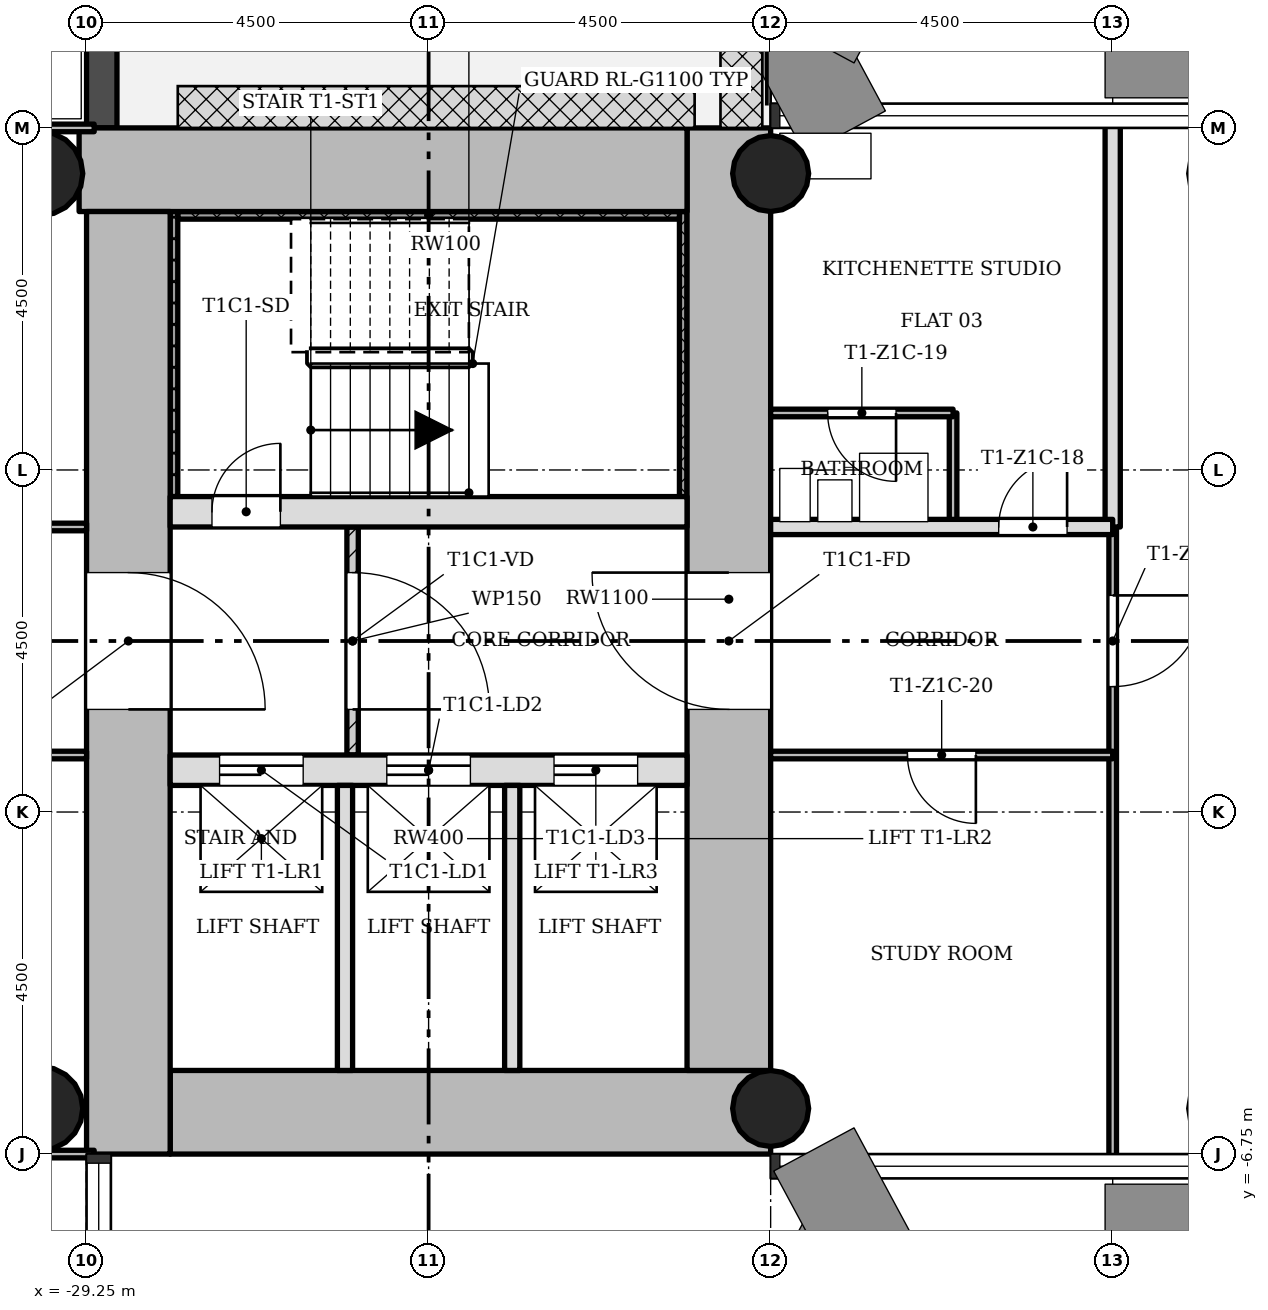
"""IFC4 building model, lengths in metres.
Left out: names, types, materials, properties, quantities, classifications, styles, units other than length and angle.
Written with IfcOpenShell. Run it as: python <this file> out.ifc"""

import sys

from ifc_helpers import new_model, si_unit, direction, frame, frame_2d, origin, origin_2d, place, context, subcontext, project, spatial, rectangle, hollow_circle, extrude, element, fill, save


model = new_model("IFC4")
c1 = context("Model", 3, precision=1e-05, world=origin(), true_north=direction((0.0, 1.0)))
c2 = subcontext(c1, "Body", "Model", "MODEL_VIEW")
j1 = project(units=[si_unit("LENGTHUNIT", "METRE"), si_unit("PLANEANGLEUNIT", "RADIAN")], contexts=[c1])
p1 = place(None, origin())
s1 = spatial("IfcSite", under=j1, at=p1, CompositionType="ELEMENT")
p2 = place(p1, origin())
s2 = spatial("IfcBuilding", under=s1, at=p2, CompositionType="ELEMENT")
p3 = place(p2, frame((0.0, 0.0, 51.7)))
s3 = spatial("IfcBuildingStorey", under=s2, at=p3, CompositionType="ELEMENT", Elevation=51.7)
p4 = place(p3, frame((-28.15, -6.2, 0.0), z_axis=(0.0, 0.0, 1.0), x_axis=(1.0, 0.0, 0.0)))
e1 = element("IfcWall", 1, at=p4, inside=s3, PredefinedType="SHEAR", context=c2, shape_type="SweptSolid", body=[
    extrude(rectangle(XDim=7.9, YDim=1.1, at=frame_2d((3.95, 0.0))), origin(), (0.0, 0.0, 1.0), 3.4),
])
p5 = place(p3, frame((-20.8, -5.65, 0.0), z_axis=(0.0, 0.0, 1.0), x_axis=(0.0, 1.0, 0.0)))
e2 = element("IfcWall", 2, at=p5, inside=s3, PredefinedType="SHEAR", context=c2, shape_type="SweptSolid", body=[
    extrude(rectangle(XDim=12.4, YDim=1.1, at=frame_2d((6.2, 0.0))), origin(), (0.0, 0.0, 1.0), 3.4),
])
p6 = place(p5, frame((4.75, 0.0, 0.0)))
e3 = element("IfcOpeningElement", 3, at=p6, cuts=e2, PredefinedType="OPENING", context=c2, shape_type="SweptSolid", body=[
    extrude(rectangle(XDim=1.8, YDim=2.1, at=frame_2d((0.9, 1.05))), frame((0.0, 0.56, 0.0), z_axis=(0.0, -1.0, 0.0), x_axis=(1.0, 0.0, 0.0)), (0.0, 0.0, 1.0), 1.12),
])
p7 = place(p3, frame((-21.35, 6.2, 0.0), z_axis=(0.0, 0.0, 1.0), x_axis=(-1.0, 0.0, 0.0)))
e4 = element("IfcWall", 4, at=p7, inside=s3, PredefinedType="SHEAR", context=c2, shape_type="SweptSolid", body=[
    extrude(rectangle(XDim=7.998, YDim=1.1, at=frame_2d((3.999, 0.0))), origin(), (0.0, 0.0, 1.0), 3.4),
])
p8 = place(p3, frame((-28.7, 5.65, 0.0), z_axis=(0.0, 0.0, 1.0), x_axis=(0.0, -1.0, 0.0)))
e5 = element("IfcWall", 5, at=p8, inside=s3, PredefinedType="SHEAR", context=c2, shape_type="SweptSolid", body=[
    extrude(rectangle(XDim=12.4, YDim=1.1, at=frame_2d((6.2, 0.0))), origin(), (0.0, 0.0, 1.0), 3.4),
])
p9 = place(p8, frame((4.75, 0.0, 0.0)))
e6 = element("IfcOpeningElement", 6, at=p9, cuts=e5, PredefinedType="OPENING", context=c2, shape_type="SweptSolid", body=[
    extrude(rectangle(XDim=1.8, YDim=2.1, at=frame_2d((0.9, 1.05))), frame((0.0, 0.56, 0.0), z_axis=(0.0, -1.0, 0.0), x_axis=(1.0, 0.0, 0.0)), (0.0, 0.0, 1.0), 1.12),
])
p10 = place(p3, frame((-28.15, -1.7, 0.0), z_axis=(0.0, 0.0, 1.0), x_axis=(1.0, 0.0, 0.0)))
e7 = element("IfcWall", 7, at=p10, inside=s3, PredefinedType="SHEAR", context=c2, shape_type="SweptSolid", body=[
    extrude(rectangle(XDim=6.8, YDim=0.4, at=frame_2d((3.4, 0.0))), origin(), (0.0, 0.0, 1.0), 3.4),
])
p11 = place(p10, frame((0.65, 0.0, 0.0)))
e8 = element("IfcOpeningElement", 8, at=p11, cuts=e7, PredefinedType="OPENING", context=c2, shape_type="SweptSolid", body=[
    extrude(rectangle(XDim=1.1, YDim=2.1, at=frame_2d((0.55, 1.05))), frame((0.0, 0.21, 0.0), z_axis=(0.0, -1.0, 0.0), x_axis=(1.0, 0.0, 0.0)), (0.0, 0.0, 1.0), 0.42),
])
p12 = place(p10, frame((2.85, 0.0, 0.0)))
e9 = element("IfcOpeningElement", 9, at=p12, cuts=e7, PredefinedType="OPENING", context=c2, shape_type="SweptSolid", body=[
    extrude(rectangle(XDim=1.1, YDim=2.1, at=frame_2d((0.55, 1.05))), frame((0.0, 0.21, 0.0), z_axis=(0.0, -1.0, 0.0), x_axis=(1.0, 0.0, 0.0)), (0.0, 0.0, 1.0), 0.42),
])
p13 = place(p10, frame((5.05, 0.0, 0.0)))
e10 = element("IfcOpeningElement", 10, at=p13, cuts=e7, PredefinedType="OPENING", context=c2, shape_type="SweptSolid", body=[
    extrude(rectangle(XDim=1.1, YDim=2.1, at=frame_2d((0.55, 1.05))), frame((0.0, 0.21, 0.0), z_axis=(0.0, -1.0, 0.0), x_axis=(1.0, 0.0, 0.0)), (0.0, 0.0, 1.0), 0.42),
])
p14 = place(p3, frame((-28.15, 1.7, 0.0), z_axis=(0.0, 0.0, 1.0), x_axis=(1.0, 0.0, 0.0)))
e11 = element("IfcWall", 11, at=p14, inside=s3, PredefinedType="SHEAR", context=c2, shape_type="SweptSolid", body=[
    extrude(rectangle(XDim=6.8, YDim=0.4, at=frame_2d((3.4, 0.0))), origin(), (0.0, 0.0, 1.0), 3.4),
])
p15 = place(p14, frame((0.55, 0.0, 0.0)))
e12 = element("IfcOpeningElement", 12, at=p15, cuts=e11, PredefinedType="OPENING", context=c2, shape_type="SweptSolid", body=[
    extrude(rectangle(XDim=0.9, YDim=2.1, at=frame_2d((0.45, 1.05))), frame((0.0, 0.21, 0.0), z_axis=(0.0, -1.0, 0.0), x_axis=(1.0, 0.0, 0.0)), (0.0, 0.0, 1.0), 0.42),
])
for number, where, z_axis, x_axis in (
    (13, (-20.25, -6.15, 0.0), (0.0, 0.0, 1.0), (1.0, 0.0, 0.0)),
    (14, (-20.25, 6.15, 0.0), (0.0, 0.0, 1.0), (1.0, 0.0, 0.0)),
):
    element("IfcColumn", number, at=place(p3, frame(where, z_axis=z_axis, x_axis=x_axis)), inside=s3, PredefinedType="COLUMN", context=c2, shape_type="SweptSolid", body=[
        extrude(hollow_circle(Radius=0.5, WallThickness=0.036, at=origin_2d()), origin(), (0.0, 0.0, 1.0), 3.4),
    ])
for number, where, z_axis, x_axis in (
    (15, (-29.85, -6.15, 0.0), (0.0, 0.0, 1.0), (1.0, 0.0, 0.0)),
    (16, (-29.85, 6.15, 0.0), (0.0, 0.0, 1.0), (1.0, 0.0, 0.0)),
):
    element("IfcColumn", number, at=place(p3, frame(where, z_axis=z_axis, x_axis=x_axis)), inside=s3, PredefinedType="COLUMN", context=c2, shape_type="SweptSolid", body=[
        extrude(hollow_circle(Radius=0.55, WallThickness=0.04, at=origin_2d()), origin(), (0.0, 0.0, 1.0), 3.4),
    ])
p16 = place(p3, frame((-29.05, 6.75, -0.02), z_axis=(0.0, 0.0, 1.0), x_axis=(0.0, 1.0, 0.0)))
e17 = element("IfcWall", 17, at=p16, inside=s3, PredefinedType="STANDARD", context=c2, shape_type="SweptSolid", body=[
    extrude(rectangle(XDim=4.5, YDim=0.4, at=frame_2d((2.25, 0.0))), origin(), (0.0, 0.0, 1.0), 3.12),
])
p17 = place(p16, frame((1.35, 0.0, 0.02)))
e18 = element("IfcOpeningElement", 18, at=p17, cuts=e17, PredefinedType="OPENING", context=c2, shape_type="SweptSolid", body=[
    extrude(rectangle(XDim=1.8, YDim=2.1, at=frame_2d((0.9, 1.05))), frame((0.0, 0.21, 0.0), z_axis=(0.0, -1.0, 0.0), x_axis=(1.0, 0.0, 0.0)), (0.0, 0.0, 1.0), 0.42),
])
p18 = place(p3, frame((-25.75, -1.5, 0.0), z_axis=(0.0, 0.0, 1.0), x_axis=(0.0, 1.0, 0.0)))
e19 = element("IfcWall", 19, at=p18, inside=s3, PredefinedType="PARTITIONING", context=c2, shape_type="SweptSolid", body=[
    extrude(rectangle(XDim=3.0, YDim=0.15, at=frame_2d((1.5, 0.0))), origin(), (0.0, 0.0, 1.0), 3.0),
])
p19 = place(p18, frame((0.6, 0.0, 0.0)))
e20 = element("IfcOpeningElement", 20, at=p19, cuts=e19, PredefinedType="OPENING", context=c2, shape_type="SweptSolid", body=[
    extrude(rectangle(XDim=1.8, YDim=2.1, at=frame_2d((0.9, 1.05))), frame((0.0, 0.085, 0.0), z_axis=(0.0, -1.0, 0.0), x_axis=(1.0, 0.0, 0.0)), (0.0, 0.0, 1.0), 0.17),
])
for number, where, z_axis, x_axis in (
    (21, (-25.85, -5.65, 0.0), (0.0, 0.0, 1.0), (0.0, 1.0, 0.0)),
    (22, (-23.65, -5.65, 0.0), (0.0, 0.0, 1.0), (0.0, 1.0, 0.0)),
):
    element("IfcWall", number, at=place(p3, frame(where, z_axis=z_axis, x_axis=x_axis)), inside=s3, PredefinedType="SOLIDWALL", context=c2, shape_type="SweptSolid", body=[
        extrude(rectangle(XDim=3.75, YDim=0.2, at=frame_2d((1.875, 0.0))), origin(), (0.0, 0.0, 1.0), 3.0),
    ])
p20 = place(p3, frame((-17.85, 1.5, 0.0), z_axis=(0.0, 0.0, 1.0), x_axis=(0.0, 1.0, 0.0)))
e23 = element("IfcWall", 23, at=p20, inside=s3, PredefinedType="PARTITIONING", context=c2, shape_type="SweptSolid", body=[
    extrude(rectangle(XDim=1.5, YDim=0.1, at=frame_2d((0.75, 0.0))), origin(), (0.0, 0.0, 1.0), 3.0),
])
p21 = place(p3, frame((-15.75, -6.85, 0.0), z_axis=(0.0, 0.0, 1.0), x_axis=(0.0, 1.0, 0.0)))
e24 = element("IfcWall", 24, at=p21, inside=s3, PredefinedType="PARTITIONING", context=c2, shape_type="SweptSolid", body=[
    extrude(rectangle(XDim=8.35, YDim=0.1, at=frame_2d((4.175, 0.0))), origin(), (0.0, 0.0, 1.0), 3.0),
])
p22 = place(p21, frame((6.25, 0.0, 0.0)))
e25 = element("IfcOpeningElement", 25, at=p22, cuts=e24, PredefinedType="OPENING", context=c2, shape_type="SweptSolid", body=[
    extrude(rectangle(XDim=1.2, YDim=2.1, at=frame_2d((0.6, 1.05))), frame((0.0, 0.06, 0.0), z_axis=(0.0, -1.0, 0.0), x_axis=(1.0, 0.0, 0.0)), (0.0, 0.0, 1.0), 0.12),
])
p23 = place(p3, frame((-15.75, 1.5, 0.0), z_axis=(0.0, 0.0, 1.0), x_axis=(0.0, 1.0, 0.0)))
e26 = element("IfcWall", 26, at=p23, inside=s3, PredefinedType="SOLIDWALL", context=c2, shape_type="SweptSolid", body=[
    extrude(rectangle(XDim=5.35, YDim=0.2, at=frame_2d((2.675, 0.0))), origin(), (0.0, 0.0, 1.0), 3.0),
])
p24 = place(p3, frame((-35.1, -6.75, 0.0), z_axis=(0.0, 0.0, 1.0), x_axis=(1.0, 0.0, 0.0)))
e27 = element("IfcWall", 27, at=p24, inside=s3, PredefinedType="PARTITIONING", context=c2, shape_type="SweptSolid", body=[
    extrude(rectangle(XDim=5.95, YDim=0.1, at=frame_2d((2.975, 0.0))), origin(), (0.0, 0.0, 1.0), 3.0),
])
p25 = place(p3, frame((-35.1, -1.5, 0.0), z_axis=(0.0, 0.0, 1.0), x_axis=(1.0, 0.0, 0.0)))
e28 = element("IfcWall", 28, at=p25, inside=s3, PredefinedType="PARTITIONING", context=c2, shape_type="SweptSolid", body=[
    extrude(rectangle(XDim=5.85, YDim=0.1, at=frame_2d((2.925, 0.0))), origin(), (0.0, 0.0, 1.0), 3.0),
])
p26 = place(p25, frame((2.475, 0.0, 0.0)))
e29 = element("IfcOpeningElement", 29, at=p26, cuts=e28, PredefinedType="OPENING", context=c2, shape_type="SweptSolid", body=[
    extrude(rectangle(XDim=0.9, YDim=2.1, at=frame_2d((0.45, 1.05))), frame((0.0, 0.06, 0.0), z_axis=(0.0, -1.0, 0.0), x_axis=(1.0, 0.0, 0.0)), (0.0, 0.0, 1.0), 0.12),
])
p27 = place(p3, frame((-20.25, -1.5, 0.0), z_axis=(0.0, 0.0, 1.0), x_axis=(1.0, 0.0, 0.0)))
e30 = element("IfcWall", 30, at=p27, inside=s3, PredefinedType="PARTITIONING", context=c2, shape_type="SweptSolid", body=[
    extrude(rectangle(XDim=4.5, YDim=0.1, at=frame_2d((2.25, 0.0))), origin(), (0.0, 0.0, 1.0), 3.0),
])
p28 = place(p27, frame((1.8, 0.0, 0.0)))
e31 = element("IfcOpeningElement", 31, at=p28, cuts=e30, PredefinedType="OPENING", context=c2, shape_type="SweptSolid", body=[
    extrude(rectangle(XDim=0.9, YDim=2.1, at=frame_2d((0.45, 1.05))), frame((0.0, 0.06, 0.0), z_axis=(0.0, -1.0, 0.0), x_axis=(1.0, 0.0, 0.0)), (0.0, 0.0, 1.0), 0.12),
])
p29 = place(p3, frame((-35.1, 1.5, 0.0), z_axis=(0.0, 0.0, 1.0), x_axis=(1.0, 0.0, 0.0)))
e32 = element("IfcWall", 32, at=p29, inside=s3, PredefinedType="PARTITIONING", context=c2, shape_type="SweptSolid", body=[
    extrude(rectangle(XDim=5.85, YDim=0.1, at=frame_2d((2.925, 0.0))), origin(), (0.0, 0.0, 1.0), 3.0),
])
p30 = place(p29, frame((3.375, 0.0, 0.0)))
e33 = element("IfcOpeningElement", 33, at=p30, cuts=e32, PredefinedType="OPENING", context=c2, shape_type="SweptSolid", body=[
    extrude(rectangle(XDim=0.9, YDim=2.1, at=frame_2d((0.45, 1.05))), frame((0.0, 0.06, 0.0), z_axis=(0.0, -1.0, 0.0), x_axis=(1.0, 0.0, 0.0)), (0.0, 0.0, 1.0), 0.12),
])
p31 = place(p3, frame((-20.25, 1.5, 0.0), z_axis=(0.0, 0.0, 1.0), x_axis=(1.0, 0.0, 0.0)))
e34 = element("IfcWall", 34, at=p31, inside=s3, PredefinedType="SOLIDWALL", context=c2, shape_type="SweptSolid", body=[
    extrude(rectangle(XDim=4.5, YDim=0.2, at=frame_2d((2.25, 0.0))), origin(), (0.0, 0.0, 1.0), 3.0),
])
p32 = place(p31, frame((3.0, 0.0, 0.0)))
e35 = element("IfcOpeningElement", 35, at=p32, cuts=e34, PredefinedType="OPENING", context=c2, shape_type="SweptSolid", body=[
    extrude(rectangle(XDim=0.9, YDim=2.1, at=frame_2d((0.45, 1.05))), frame((0.0, 0.11, 0.0), z_axis=(0.0, -1.0, 0.0), x_axis=(1.0, 0.0, 0.0)), (0.0, 0.0, 1.0), 0.22),
])
p33 = place(p3, frame((-20.25, 3.0, 0.0), z_axis=(0.0, 0.0, 1.0), x_axis=(1.0, 0.0, 0.0)))
e36 = element("IfcWall", 36, at=p33, inside=s3, PredefinedType="PARTITIONING", context=c2, shape_type="SweptSolid", body=[
    extrude(rectangle(XDim=2.4, YDim=0.1, at=frame_2d((1.2, 0.0))), origin(), (0.0, 0.0, 1.0), 3.0),
])
p34 = place(p33, frame((0.75, 0.0, 0.0)))
e37 = element("IfcOpeningElement", 37, at=p34, cuts=e36, PredefinedType="OPENING", context=c2, shape_type="SweptSolid", body=[
    extrude(rectangle(XDim=0.9, YDim=2.1, at=frame_2d((0.45, 1.05))), frame((0.0, 0.06, 0.0), z_axis=(0.0, -1.0, 0.0), x_axis=(1.0, 0.0, 0.0)), (0.0, 0.0, 1.0), 0.12),
])
p35 = place(p3, frame((-35.1, 6.75, 0.0), z_axis=(0.0, 0.0, 1.0), x_axis=(1.0, 0.0, 0.0)))
e38 = element("IfcWall", 38, at=p35, inside=s3, PredefinedType="PARTITIONING", context=c2, shape_type="SweptSolid", body=[
    extrude(rectangle(XDim=5.95, YDim=0.1, at=frame_2d((2.975, 0.0))), origin(), (0.0, 0.0, 1.0), 3.0),
])
p36 = place(p3, frame((-21.4, 1.9, 0.0), z_axis=(0.0, 0.0, 1.0), x_axis=(0.0, 1.0, 0.0)))
e39 = element("IfcWall", 39, at=p36, inside=s3, PredefinedType="SHEAR", context=c2, shape_type="SweptSolid", body=[
    extrude(rectangle(XDim=3.75, YDim=0.1, at=frame_2d((1.875, 0.0))), origin(), (0.0, 0.0, 1.0), 3.4),
])
p37 = place(p3, frame((-28.05, 5.6, 0.0), z_axis=(0.0, 0.0, 1.0), x_axis=(1.0, 0.0, 0.0)))
e40 = element("IfcWall", 40, at=p37, inside=s3, PredefinedType="SHEAR", context=c2, shape_type="SweptSolid", body=[
    extrude(rectangle(XDim=6.6, YDim=0.1, at=frame_2d((3.3, 0.0))), origin(), (0.0, 0.0, 1.0), 3.4),
])
p38 = place(p3, frame((-28.1, 1.9, 0.0), z_axis=(0.0, 0.0, 1.0), x_axis=(0.0, 1.0, 0.0)))
e41 = element("IfcWall", 41, at=p38, inside=s3, PredefinedType="SHEAR", context=c2, shape_type="SweptSolid", body=[
    extrude(rectangle(XDim=3.75, YDim=0.1, at=frame_2d((1.875, 0.0))), origin(), (0.0, 0.0, 1.0), 3.4),
])
p39 = place(p19, origin())
e42 = element("IfcDoor", 42, at=p39, inside=s3, OperationType="SINGLE_SWING_LEFT", PredefinedType="DOOR", context=c2, shape_type="SweptSolid", body=[
    extrude(rectangle(XDim=1.8, YDim=2.1, at=frame_2d((0.9, 1.05))), frame((0.0, 0.025, 0.0), z_axis=(0.0, -1.0, 0.0), x_axis=(1.0, 0.0, 0.0)), (0.0, 0.0, 1.0), 0.05),
])
fill(e20, e42)
p40 = place(p32, origin())
e43 = element("IfcDoor", 43, at=p40, inside=s3, OperationType="SINGLE_SWING_LEFT", PredefinedType="DOOR", context=c2, shape_type="SweptSolid", body=[
    extrude(rectangle(XDim=0.9, YDim=2.1, at=frame_2d((0.45, 1.05))), frame((0.0, 0.025, 0.0), z_axis=(0.0, -1.0, 0.0), x_axis=(1.0, 0.0, 0.0)), (0.0, 0.0, 1.0), 0.05),
])
fill(e35, e43)
p41 = place(p34, origin())
e44 = element("IfcDoor", 44, at=p41, inside=s3, OperationType="SINGLE_SWING_RIGHT", PredefinedType="DOOR", context=c2, shape_type="SweptSolid", body=[
    extrude(rectangle(XDim=0.9, YDim=2.1, at=frame_2d((0.45, 1.05))), frame((0.0, 0.025, 0.0), z_axis=(0.0, -1.0, 0.0), x_axis=(1.0, 0.0, 0.0)), (0.0, 0.0, 1.0), 0.05),
])
fill(e37, e44)
p42 = place(p28, origin())
e45 = element("IfcDoor", 45, at=p42, inside=s3, OperationType="SINGLE_SWING_RIGHT", PredefinedType="DOOR", context=c2, shape_type="SweptSolid", body=[
    extrude(rectangle(XDim=0.9, YDim=2.1, at=frame_2d((0.45, 1.05))), frame((0.0, 0.025, 0.0), z_axis=(0.0, -1.0, 0.0), x_axis=(1.0, 0.0, 0.0)), (0.0, 0.0, 1.0), 0.05),
])
fill(e31, e45)
p43 = place(p22, origin())
e46 = element("IfcDoor", 46, at=p43, inside=s3, OperationType="SINGLE_SWING_RIGHT", PredefinedType="DOOR", context=c2, shape_type="SweptSolid", body=[
    extrude(rectangle(XDim=1.2, YDim=2.1, at=frame_2d((0.6, 1.05))), frame((0.0, 0.025, 0.0), z_axis=(0.0, -1.0, 0.0), x_axis=(1.0, 0.0, 0.0)), (0.0, 0.0, 1.0), 0.05),
])
fill(e25, e46)
p44 = place(p15, origin())
e47 = element("IfcDoor", 47, at=p44, inside=s3, OperationType="SINGLE_SWING_LEFT", PredefinedType="DOOR", context=c2, shape_type="SweptSolid", body=[
    extrude(rectangle(XDim=0.9, YDim=2.1, at=frame_2d((0.45, 1.05))), frame((0.0, 0.025, 0.0), z_axis=(0.0, -1.0, 0.0), x_axis=(1.0, 0.0, 0.0)), (0.0, 0.0, 1.0), 0.05),
])
fill(e12, e47)
p45 = place(p11, origin())
e48 = element("IfcDoor", 48, at=p45, inside=s3, OperationType="SLIDING_TO_LEFT", PredefinedType="DOOR", context=c2, shape_type="SweptSolid", body=[
    extrude(rectangle(XDim=1.1, YDim=2.1, at=frame_2d((0.55, 1.05))), frame((0.0, 0.025, 0.0), z_axis=(0.0, -1.0, 0.0), x_axis=(1.0, 0.0, 0.0)), (0.0, 0.0, 1.0), 0.05),
])
fill(e8, e48)
p46 = place(p12, origin())
e49 = element("IfcDoor", 49, at=p46, inside=s3, OperationType="SLIDING_TO_LEFT", PredefinedType="DOOR", context=c2, shape_type="SweptSolid", body=[
    extrude(rectangle(XDim=1.1, YDim=2.1, at=frame_2d((0.55, 1.05))), frame((0.0, 0.025, 0.0), z_axis=(0.0, -1.0, 0.0), x_axis=(1.0, 0.0, 0.0)), (0.0, 0.0, 1.0), 0.05),
])
fill(e9, e49)
p47 = place(p13, origin())
e50 = element("IfcDoor", 50, at=p47, inside=s3, OperationType="SLIDING_TO_LEFT", PredefinedType="DOOR", context=c2, shape_type="SweptSolid", body=[
    extrude(rectangle(XDim=1.1, YDim=2.1, at=frame_2d((0.55, 1.05))), frame((0.0, 0.025, 0.0), z_axis=(0.0, -1.0, 0.0), x_axis=(1.0, 0.0, 0.0)), (0.0, 0.0, 1.0), 0.05),
])
fill(e10, e50)
p48 = place(p9, origin())
e51 = element("IfcDoor", 51, at=p48, inside=s3, OperationType="SINGLE_SWING_LEFT", PredefinedType="DOOR", context=c2, shape_type="SweptSolid", body=[
    extrude(rectangle(XDim=1.8, YDim=2.1, at=frame_2d((0.9, 1.05))), frame((0.0, 0.025, 0.0), z_axis=(0.0, -1.0, 0.0), x_axis=(1.0, 0.0, 0.0)), (0.0, 0.0, 1.0), 0.05),
])
fill(e6, e51)
p49 = place(p6, origin())
e52 = element("IfcDoor", 52, at=p49, inside=s3, OperationType="SINGLE_SWING_LEFT", PredefinedType="DOOR", context=c2, shape_type="SweptSolid", body=[
    extrude(rectangle(XDim=1.8, YDim=2.1, at=frame_2d((0.9, 1.05))), frame((0.0, 0.025, 0.0), z_axis=(0.0, -1.0, 0.0), x_axis=(1.0, 0.0, 0.0)), (0.0, 0.0, 1.0), 0.05),
])
fill(e3, e52)
save(model, sys.argv[1])
